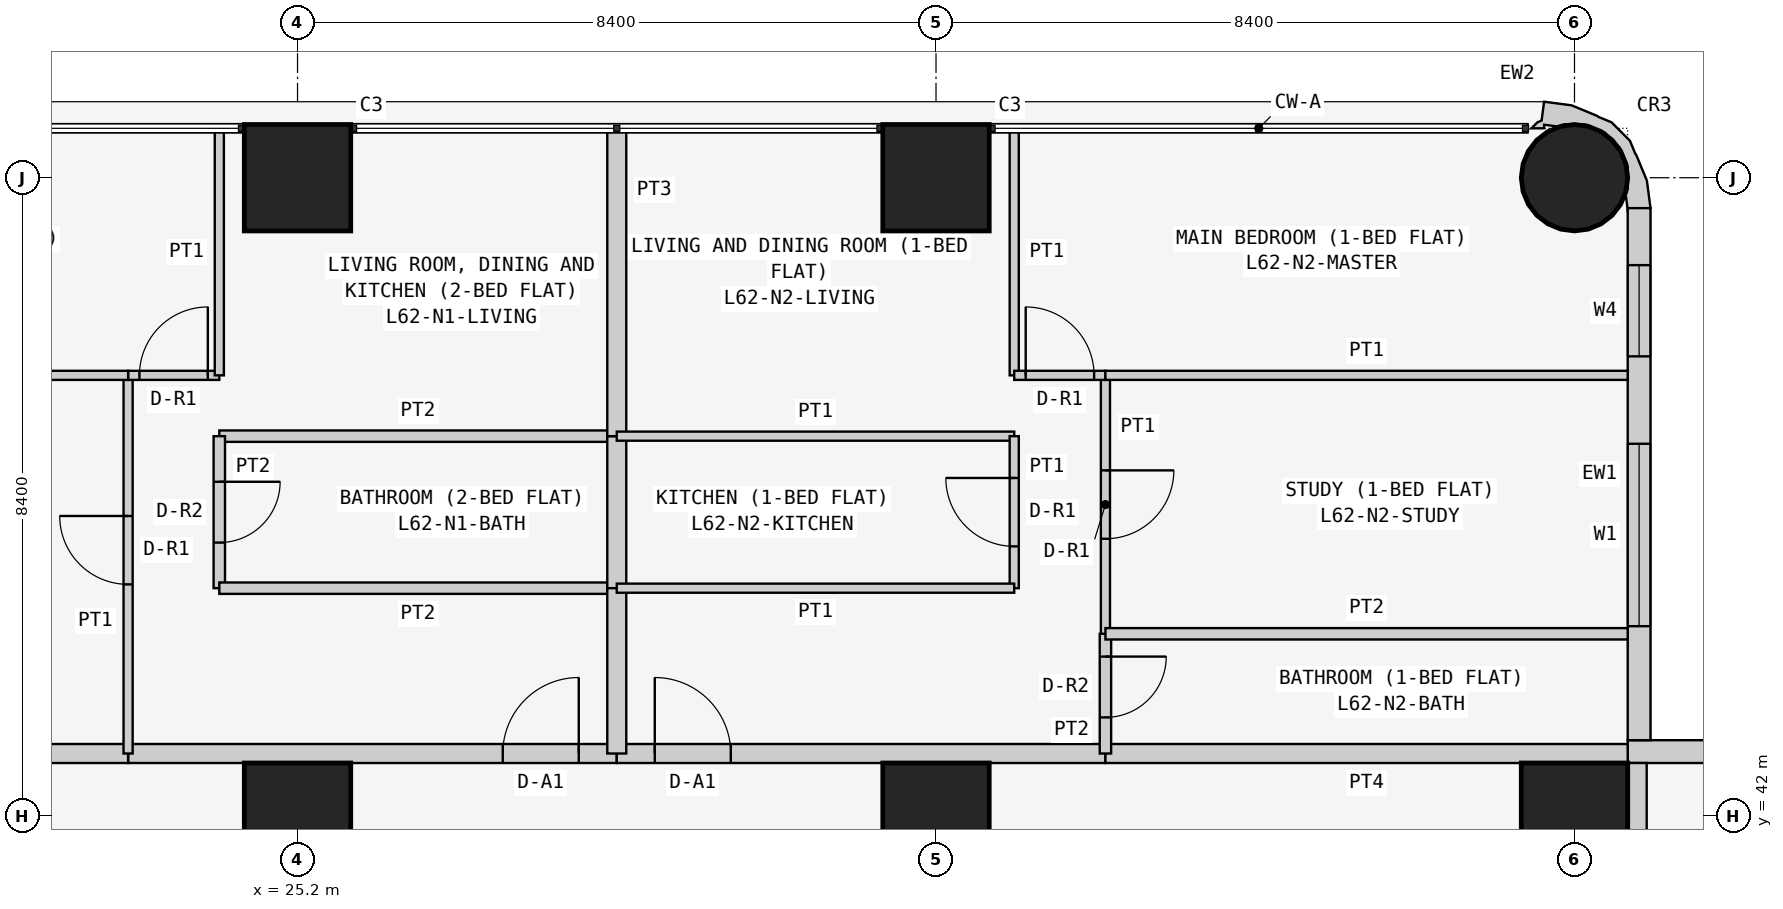
"""IFC4 building model, lengths in metres.
Left out: names, types, materials, properties, quantities, classifications, styles, units other than length and angle.
Written with IfcOpenShell. Run it as: python <this file> out.ifc"""

import sys

from ifc_helpers import new_model, si_unit, direction, frame, frame_2d, origin, origin_2d, place, context, subcontext, project, spatial, polyline, rectangle, circle, outline, extrude, element, fill, save


model = new_model("IFC4")
c1 = context("Model", 3, precision=1e-05, world=origin(), true_north=direction((0.0, 1.0)))
c2 = subcontext(c1, "Body", "Model", "MODEL_VIEW")
j1 = project(units=[si_unit("LENGTHUNIT", "METRE"), si_unit("PLANEANGLEUNIT", "RADIAN")], contexts=[c1])
p1 = place(None, origin())
s1 = spatial("IfcSite", under=j1, at=p1, CompositionType="ELEMENT")
p2 = place(p1, origin())
s2 = spatial("IfcBuilding", under=s1, at=p2, CompositionType="ELEMENT")
p3 = place(p2, frame((0.0, 0.0, 237.3)))
s3 = spatial("IfcBuildingStorey", under=s2, at=p3, CompositionType="ELEMENT", Elevation=237.3)
for number, where, z_axis, x_axis in (
    (1, (25.2, 42.0, 0.0), (0.0, 0.0, 1.0), (1.0, 0.0, 0.0)),
    (2, (25.2, 50.4, 0.0), (0.0, 0.0, 1.0), (1.0, 0.0, 0.0)),
    (3, (33.6, 42.0, 0.0), (0.0, 0.0, 1.0), (1.0, 0.0, 0.0)),
    (4, (33.6, 50.4, 0.0), (0.0, 0.0, 1.0), (1.0, 0.0, 0.0)),
    (5, (42.0, 42.0, 0.0), (0.0, 0.0, 1.0), (1.0, 0.0, 0.0)),
):
    element("IfcColumn", number, at=place(p3, frame(where, z_axis=z_axis, x_axis=x_axis)), inside=s3, PredefinedType="COLUMN", context=c2, shape_type="SweptSolid", body=[
        extrude(rectangle(XDim=1.4, YDim=1.4, at=origin_2d()), origin(), (0.0, 0.0, 1.0), 3.6),
    ])
p4 = place(p3, frame((42.0, 50.4, 0.0), z_axis=(0.0, 0.0, 1.0), x_axis=(1.0, 0.0, 0.0)))
e6 = element("IfcColumn", 6, at=p4, inside=s3, PredefinedType="COLUMN", context=c2, shape_type="SweptSolid", body=[
    extrude(circle(Radius=0.7, at=origin_2d()), origin(), (0.0, 0.0, 1.0), 3.6),
])
p5 = place(p3, frame((50.0, 42.85, 0.0), z_axis=(0.0, 0.0, 1.0), x_axis=(-1.0, 0.0, 0.0)))
e7 = element("IfcWall", 7, at=p5, inside=s3, PredefinedType="SOLIDWALL", context=c2, shape_type="SweptSolid", body=[
    extrude(rectangle(XDim=7.3, YDim=0.3, at=frame_2d((3.65, 0.0))), origin(), (0.0, 0.0, 1.0), 3.45),
])
p6 = place(p5, frame((3.1, 0.0, 0.9)))
e8 = element("IfcOpeningElement", 8, at=p6, cuts=e7, PredefinedType="OPENING", context=c2, shape_type="SweptSolid", body=[
    extrude(rectangle(XDim=2.4, YDim=1.5, at=frame_2d((1.2, 0.75))), frame((0.0, 0.16, 0.0), z_axis=(0.0, -1.0, 0.0), x_axis=(1.0, 0.0, 0.0)), (0.0, 0.0, 1.0), 0.32),
])
p7 = place(p5, frame((0.75, 0.0, 0.9)))
e9 = element("IfcOpeningElement", 9, at=p7, cuts=e7, PredefinedType="OPENING", context=c2, shape_type="SweptSolid", body=[
    extrude(rectangle(XDim=1.2, YDim=1.5, at=frame_2d((0.6, 0.75))), frame((0.0, 0.16, 0.0), z_axis=(0.0, -1.0, 0.0), x_axis=(1.0, 0.0, 0.0)), (0.0, 0.0, 1.0), 0.32),
])
p8 = place(p3, frame((42.85, 43.0, 0.0), z_axis=(0.0, 0.0, 1.0), x_axis=(0.0, 1.0, 0.0)))
e10 = element("IfcWall", 10, at=p8, inside=s3, PredefinedType="SOLIDWALL", context=c2, shape_type="SweptSolid", body=[
    extrude(rectangle(XDim=7.0, YDim=0.3, at=frame_2d((3.5, 0.0))), origin(), (0.0, 0.0, 1.0), 3.45),
])
p9 = place(p8, frame((1.5, 0.0, 0.9)))
e11 = element("IfcOpeningElement", 11, at=p9, cuts=e10, PredefinedType="OPENING", context=c2, shape_type="SweptSolid", body=[
    extrude(rectangle(XDim=2.4, YDim=1.5, at=frame_2d((1.2, 0.75))), frame((0.0, 0.16, 0.0), z_axis=(0.0, -1.0, 0.0), x_axis=(1.0, 0.0, 0.0)), (0.0, 0.0, 1.0), 0.32),
])
p10 = place(p8, frame((5.05, 0.0, 0.9)))
e12 = element("IfcOpeningElement", 12, at=p10, cuts=e10, PredefinedType="OPENING", context=c2, shape_type="SweptSolid", body=[
    extrude(rectangle(XDim=1.2, YDim=1.5, at=frame_2d((0.6, 0.75))), frame((0.0, 0.16, 0.0), z_axis=(0.0, -1.0, 0.0), x_axis=(1.0, 0.0, 0.0)), (0.0, 0.0, 1.0), 0.32),
])
p11 = place(p3, frame((42.724, 50.11, 0.0), z_axis=(0.0, 0.0, 1.0), x_axis=(0.439933741929, 0.898030234854, 0.0)))
e13 = element("IfcWall", 13, at=p11, inside=s3, PredefinedType="SOLIDWALL", context=c2, shape_type="SweptSolid", body=[
    extrude(outline(polyline([(-0.145, -0.044), (0.022, -0.296), (0.327, -0.094), (0.568, 0.18), (0.577, 0.199), (0.7, 0.337), (0.811, 0.661), (0.799, 0.845), (0.803, 0.866), (0.78, 1.231), (0.664, 1.577), (0.426, 1.497), (0.382, 1.536), (0.276, 1.572), (0.349, 1.423), (0.392, 1.444), (0.453, 1.261), (0.51, 1.211), (0.632, 0.961), (0.65, 0.683), (0.56, 0.419), (0.375, 0.21), (0.125, 0.087), (0.05, 0.082), (-0.127, -0.035), (-0.145, -0.044)])), origin(), (0.0, 0.0, 1.0), 3.45),
])
p12 = place(p3, frame((22.971, 42.825, 0.0), z_axis=(0.0, 0.0, 1.0), x_axis=(1.0, 0.0, 0.0)))
e14 = element("IfcWall", 14, at=p12, inside=s3, PredefinedType="PARTITIONING", context=c2, shape_type="SweptSolid", body=[
    extrude(rectangle(XDim=6.429, YDim=0.25, at=frame_2d((3.214, 0.0))), origin(), (0.0, 0.0, 1.0), 3.45),
])
p13 = place(p12, frame((4.929, 0.0, 0.0)))
e15 = element("IfcOpeningElement", 15, at=p13, cuts=e14, PredefinedType="OPENING", context=c2, shape_type="SweptSolid", body=[
    extrude(rectangle(XDim=1.0, YDim=2.1, at=frame_2d((0.5, 1.05))), frame((0.0, 0.135, 0.0), z_axis=(0.0, -1.0, 0.0), x_axis=(1.0, 0.0, 0.0)), (0.0, 0.0, 1.0), 0.27),
])
p14 = place(p3, frame((16.1, 42.825, 0.0), z_axis=(0.0, 0.0, 1.0), x_axis=(1.0, 0.0, 0.0)))
e16 = element("IfcWall", 16, at=p14, inside=s3, PredefinedType="PARTITIONING", context=c2, shape_type="SweptSolid", body=[
    extrude(rectangle(XDim=6.871, YDim=0.25, at=frame_2d((3.436, 0.0))), origin(), (0.0, 0.0, 1.0), 3.45),
])
p15 = place(p3, frame((29.4, 42.825, 0.0), z_axis=(0.0, 0.0, 1.0), x_axis=(1.0, 0.0, 0.0)))
e17 = element("IfcWall", 17, at=p15, inside=s3, PredefinedType="PARTITIONING", context=c2, shape_type="SweptSolid", body=[
    extrude(rectangle(XDim=6.429, YDim=0.25, at=frame_2d((3.215, 0.0))), origin(), (0.0, 0.0, 1.0), 3.45),
])
p16 = place(p15, frame((0.5, 0.0, 0.0)))
e18 = element("IfcOpeningElement", 18, at=p16, cuts=e17, PredefinedType="OPENING", context=c2, shape_type="SweptSolid", body=[
    extrude(rectangle(XDim=1.0, YDim=2.1, at=frame_2d((0.5, 1.05))), frame((0.0, 0.135, 0.0), z_axis=(0.0, -1.0, 0.0), x_axis=(1.0, 0.0, 0.0)), (0.0, 0.0, 1.0), 0.27),
])
for number, where, z_axis, x_axis in (
    (19, (35.829, 42.825, 0.0), (0.0, 0.0, 1.0), (1.0, 0.0, 0.0)),
    (20, (42.825, 42.7, 0.0), (0.0, 0.0, 1.0), (0.0, -1.0, 0.0)),
):
    element("IfcWall", number, at=place(p3, frame(where, z_axis=z_axis, x_axis=x_axis)), inside=s3, PredefinedType="PARTITIONING", context=c2, shape_type="SweptSolid", body=[
        extrude(rectangle(XDim=6.871, YDim=0.25, at=frame_2d((3.436, 0.0))), origin(), (0.0, 0.0, 1.0), 3.45),
    ])
p17 = place(p3, frame((29.4, 47.0, 0.0), z_axis=(0.0, 0.0, 1.0), x_axis=(-1.0, 0.0, 0.0)))
e21 = element("IfcWall", 21, at=p17, inside=s3, PredefinedType="PARTITIONING", context=c2, shape_type="SweptSolid", body=[
    extrude(rectangle(XDim=5.229, YDim=0.15, at=frame_2d((2.615, 0.0))), origin(), (0.0, 0.0, 1.0), 3.45),
])
p18 = place(p3, frame((24.171, 47.0, 0.0), z_axis=(0.0, 0.0, 1.0), x_axis=(0.0, -1.0, 0.0)))
e22 = element("IfcWall", 22, at=p18, inside=s3, PredefinedType="PARTITIONING", context=c2, shape_type="SweptSolid", body=[
    extrude(rectangle(XDim=2.0, YDim=0.15, at=frame_2d((1.0, 0.0))), origin(), (0.0, 0.0, 1.0), 3.45),
])
p19 = place(p18, frame((0.6, 0.0, 0.0)))
e23 = element("IfcOpeningElement", 23, at=p19, cuts=e22, PredefinedType="OPENING", context=c2, shape_type="SweptSolid", body=[
    extrude(rectangle(XDim=0.8, YDim=2.1, at=frame_2d((0.4, 1.05))), frame((0.0, 0.085, 0.0), z_axis=(0.0, -1.0, 0.0), x_axis=(1.0, 0.0, 0.0)), (0.0, 0.0, 1.0), 0.17),
])
p20 = place(p3, frame((24.171, 45.0, 0.0), z_axis=(0.0, 0.0, 1.0), x_axis=(1.0, 0.0, 0.0)))
e24 = element("IfcWall", 24, at=p20, inside=s3, PredefinedType="PARTITIONING", context=c2, shape_type="SweptSolid", body=[
    extrude(rectangle(XDim=5.229, YDim=0.15, at=frame_2d((2.615, 0.0))), origin(), (0.0, 0.0, 1.0), 3.45),
])
p21 = place(p3, frame((29.4, 45.0, 0.0), z_axis=(0.0, 0.0, 1.0), x_axis=(0.0, 1.0, 0.0)))
e25 = element("IfcWall", 25, at=p21, inside=s3, PredefinedType="PARTITIONING", context=c2, shape_type="SweptSolid", body=[
    extrude(rectangle(XDim=2.0, YDim=0.25, at=frame_2d((1.0, 0.0))), origin(), (0.0, 0.0, 1.0), 2.848),
])
p22 = place(p3, frame((22.971, 42.825, 0.0), z_axis=(0.0, 0.0, 1.0), x_axis=(0.0, 1.0, 0.0)))
e26 = element("IfcWall", 26, at=p22, inside=s3, PredefinedType="PARTITIONING", context=c2, shape_type="SweptSolid", body=[
    extrude(rectangle(XDim=4.975, YDim=0.12, at=frame_2d((2.488, 0.0))), origin(), (0.0, 0.0, 1.0), 3.45),
])
p23 = place(p22, frame((2.225, 0.0, 0.0)))
e27 = element("IfcOpeningElement", 27, at=p23, cuts=e26, PredefinedType="OPENING", context=c2, shape_type="SweptSolid", body=[
    extrude(rectangle(XDim=0.9, YDim=2.1, at=frame_2d((0.45, 1.05))), frame((0.0, 0.07, 0.0), z_axis=(0.0, -1.0, 0.0), x_axis=(1.0, 0.0, 0.0)), (0.0, 0.0, 1.0), 0.14),
])
p24 = place(p3, frame((22.971, 47.8, 0.0), z_axis=(0.0, 0.0, 1.0), x_axis=(1.0, 0.0, 0.0)))
e28 = element("IfcWall", 28, at=p24, inside=s3, PredefinedType="PARTITIONING", context=c2, shape_type="SweptSolid", body=[
    extrude(rectangle(XDim=1.2, YDim=0.12, at=frame_2d((0.6, 0.0))), origin(), (0.0, 0.0, 1.0), 3.45),
])
p25 = place(p24, frame((0.149, 0.0, 0.0)))
e29 = element("IfcOpeningElement", 29, at=p25, cuts=e28, PredefinedType="OPENING", context=c2, shape_type="SweptSolid", body=[
    extrude(rectangle(XDim=0.9, YDim=2.1, at=frame_2d((0.45, 1.05))), frame((0.0, 0.07, 0.0), z_axis=(0.0, -1.0, 0.0), x_axis=(1.0, 0.0, 0.0)), (0.0, 0.0, 1.0), 0.14),
])
p26 = place(p3, frame((24.171, 47.8, 0.0), z_axis=(0.0, 0.0, 1.0), x_axis=(0.0, 1.0, 0.0)))
e30 = element("IfcWall", 30, at=p26, inside=s3, PredefinedType="PARTITIONING", context=c2, shape_type="SweptSolid", body=[
    extrude(rectangle(XDim=3.25, YDim=0.12, at=frame_2d((1.625, 0.0))), origin(), (0.0, 0.0, 1.0), 3.45),
])
p27 = place(p3, frame((29.4, 45.0, 0.0), z_axis=(0.0, 0.0, 1.0), x_axis=(0.0, -1.0, 0.0)))
e31 = element("IfcWall", 31, at=p27, inside=s3, PredefinedType="PARTITIONING", context=c2, shape_type="SweptSolid", body=[
    extrude(rectangle(XDim=2.175, YDim=0.25, at=frame_2d((1.087, 0.0))), origin(), (0.0, 0.0, 1.0), 2.848),
])
p28 = place(p3, frame((29.4, 51.05, 0.0), z_axis=(0.0, 0.0, 1.0), x_axis=(0.0, -1.0, 0.0)))
e32 = element("IfcWall", 32, at=p28, inside=s3, PredefinedType="PARTITIONING", context=c2, shape_type="SweptSolid", body=[
    extrude(rectangle(XDim=4.05, YDim=0.25, at=frame_2d((2.025, 0.0))), origin(), (0.0, 0.0, 1.0), 2.848),
])
p29 = place(p3, frame((22.971, 47.8, 0.0), z_axis=(0.0, 0.0, 1.0), x_axis=(-1.0, 0.0, 0.0)))
e33 = element("IfcWall", 33, at=p29, inside=s3, PredefinedType="PARTITIONING", context=c2, shape_type="SweptSolid", body=[
    extrude(rectangle(XDim=6.871, YDim=0.12, at=frame_2d((3.436, 0.0))), origin(), (0.0, 0.0, 1.0), 3.45),
])
p30 = place(p3, frame((29.4, 47.0, 0.0), z_axis=(0.0, 0.0, 1.0), x_axis=(1.0, 0.0, 0.0)))
e34 = element("IfcWall", 34, at=p30, inside=s3, PredefinedType="PARTITIONING", context=c2, shape_type="SweptSolid", body=[
    extrude(rectangle(XDim=5.229, YDim=0.12, at=frame_2d((2.615, 0.0))), origin(), (0.0, 0.0, 1.0), 3.45),
])
p31 = place(p3, frame((34.629, 47.0, 0.0), z_axis=(0.0, 0.0, 1.0), x_axis=(0.0, -1.0, 0.0)))
e35 = element("IfcWall", 35, at=p31, inside=s3, PredefinedType="PARTITIONING", context=c2, shape_type="SweptSolid", body=[
    extrude(rectangle(XDim=2.0, YDim=0.12, at=frame_2d((1.0, 0.0))), origin(), (0.0, 0.0, 1.0), 3.45),
])
p32 = place(p31, frame((0.55, 0.0, 0.0)))
e36 = element("IfcOpeningElement", 36, at=p32, cuts=e35, PredefinedType="OPENING", context=c2, shape_type="SweptSolid", body=[
    extrude(rectangle(XDim=0.9, YDim=2.1, at=frame_2d((0.45, 1.05))), frame((0.0, 0.07, 0.0), z_axis=(0.0, -1.0, 0.0), x_axis=(1.0, 0.0, 0.0)), (0.0, 0.0, 1.0), 0.14),
])
p33 = place(p3, frame((34.629, 45.0, 0.0), z_axis=(0.0, 0.0, 1.0), x_axis=(-1.0, 0.0, 0.0)))
e37 = element("IfcWall", 37, at=p33, inside=s3, PredefinedType="PARTITIONING", context=c2, shape_type="SweptSolid", body=[
    extrude(rectangle(XDim=5.229, YDim=0.12, at=frame_2d((2.615, 0.0))), origin(), (0.0, 0.0, 1.0), 3.45),
])
p34 = place(p3, frame((35.829, 44.4, 0.0), z_axis=(0.0, 0.0, 1.0), x_axis=(0.0, -1.0, 0.0)))
e38 = element("IfcWall", 38, at=p34, inside=s3, PredefinedType="PARTITIONING", context=c2, shape_type="SweptSolid", body=[
    extrude(rectangle(XDim=1.575, YDim=0.15, at=frame_2d((0.788, 0.0))), origin(), (0.0, 0.0, 1.0), 3.45),
])
p35 = place(p34, frame((0.3, 0.0, 0.0)))
e39 = element("IfcOpeningElement", 39, at=p35, cuts=e38, PredefinedType="OPENING", context=c2, shape_type="SweptSolid", body=[
    extrude(rectangle(XDim=0.8, YDim=2.1, at=frame_2d((0.4, 1.05))), frame((0.0, 0.085, 0.0), z_axis=(0.0, -1.0, 0.0), x_axis=(1.0, 0.0, 0.0)), (0.0, 0.0, 1.0), 0.17),
])
p36 = place(p3, frame((35.829, 47.8, 0.0), z_axis=(0.0, 0.0, 1.0), x_axis=(0.0, -1.0, 0.0)))
e40 = element("IfcWall", 40, at=p36, inside=s3, PredefinedType="PARTITIONING", context=c2, shape_type="SweptSolid", body=[
    extrude(rectangle(XDim=3.4, YDim=0.12, at=frame_2d((1.7, 0.0))), origin(), (0.0, 0.0, 1.0), 3.45),
])
p37 = place(p36, frame((1.25, 0.0, 0.0)))
e41 = element("IfcOpeningElement", 41, at=p37, cuts=e40, PredefinedType="OPENING", context=c2, shape_type="SweptSolid", body=[
    extrude(rectangle(XDim=0.9, YDim=2.1, at=frame_2d((0.45, 1.05))), frame((0.0, 0.07, 0.0), z_axis=(0.0, -1.0, 0.0), x_axis=(1.0, 0.0, 0.0)), (0.0, 0.0, 1.0), 0.14),
])
p38 = place(p3, frame((34.629, 51.05, 0.0), z_axis=(0.0, 0.0, 1.0), x_axis=(0.0, -1.0, 0.0)))
e42 = element("IfcWall", 42, at=p38, inside=s3, PredefinedType="PARTITIONING", context=c2, shape_type="SweptSolid", body=[
    extrude(rectangle(XDim=3.25, YDim=0.12, at=frame_2d((1.625, 0.0))), origin(), (0.0, 0.0, 1.0), 3.45),
])
p39 = place(p3, frame((34.629, 47.8, 0.0), z_axis=(0.0, 0.0, 1.0), x_axis=(1.0, 0.0, 0.0)))
e43 = element("IfcWall", 43, at=p39, inside=s3, PredefinedType="PARTITIONING", context=c2, shape_type="SweptSolid", body=[
    extrude(rectangle(XDim=1.2, YDim=0.12, at=frame_2d((0.6, 0.0))), origin(), (0.0, 0.0, 1.0), 3.45),
])
p40 = place(p39, frame((0.151, 0.0, 0.0)))
e44 = element("IfcOpeningElement", 44, at=p40, cuts=e43, PredefinedType="OPENING", context=c2, shape_type="SweptSolid", body=[
    extrude(rectangle(XDim=0.9, YDim=2.1, at=frame_2d((0.45, 1.05))), frame((0.0, 0.07, 0.0), z_axis=(0.0, -1.0, 0.0), x_axis=(1.0, 0.0, 0.0)), (0.0, 0.0, 1.0), 0.14),
])
p41 = place(p3, frame((35.829, 44.4, 0.0), z_axis=(0.0, 0.0, 1.0), x_axis=(1.0, 0.0, 0.0)))
e45 = element("IfcWall", 45, at=p41, inside=s3, PredefinedType="PARTITIONING", context=c2, shape_type="SweptSolid", body=[
    extrude(rectangle(XDim=6.871, YDim=0.15, at=frame_2d((3.436, 0.0))), origin(), (0.0, 0.0, 1.0), 3.45),
])
p42 = place(p3, frame((35.829, 47.8, 0.0), z_axis=(0.0, 0.0, 1.0), x_axis=(1.0, 0.0, 0.0)))
e46 = element("IfcWall", 46, at=p42, inside=s3, PredefinedType="PARTITIONING", context=c2, shape_type="SweptSolid", body=[
    extrude(rectangle(XDim=6.871, YDim=0.12, at=frame_2d((3.436, 0.0))), origin(), (0.0, 0.0, 1.0), 3.45),
])
p43 = place(p9, origin())
e47 = element("IfcWindow", 47, at=p43, inside=s3, PartitioningType="SINGLE_PANEL", PredefinedType="WINDOW", context=c2, shape_type="SweptSolid", body=[
    extrude(rectangle(XDim=2.4, YDim=1.5, at=frame_2d((1.2, 0.75))), frame((0.0, 0.03, 0.0), z_axis=(0.0, -1.0, 0.0), x_axis=(1.0, 0.0, 0.0)), (0.0, 0.0, 1.0), 0.06),
])
fill(e11, e47)
p44 = place(p10, origin())
e48 = element("IfcWindow", 48, at=p44, inside=s3, PartitioningType="SINGLE_PANEL", PredefinedType="WINDOW", context=c2, shape_type="SweptSolid", body=[
    extrude(rectangle(XDim=1.2, YDim=1.5, at=frame_2d((0.6, 0.75))), frame((0.0, 0.03, 0.0), z_axis=(0.0, -1.0, 0.0), x_axis=(1.0, 0.0, 0.0)), (0.0, 0.0, 1.0), 0.06),
])
fill(e12, e48)
p45 = place(p13, origin())
e49 = element("IfcDoor", 49, at=p45, inside=s3, OperationType="SINGLE_SWING_RIGHT", PredefinedType="DOOR", context=c2, shape_type="SweptSolid", body=[
    extrude(rectangle(XDim=1.0, YDim=2.1, at=frame_2d((0.5, 1.05))), frame((0.0, 0.025, 0.0), z_axis=(0.0, -1.0, 0.0), x_axis=(1.0, 0.0, 0.0)), (0.0, 0.0, 1.0), 0.05),
])
fill(e15, e49)
p46 = place(p19, origin())
e50 = element("IfcDoor", 50, at=p46, inside=s3, OperationType="SINGLE_SWING_LEFT", PredefinedType="DOOR", context=c2, shape_type="SweptSolid", body=[
    extrude(rectangle(XDim=0.8, YDim=2.1, at=frame_2d((0.4, 1.05))), frame((0.0, 0.025, 0.0), z_axis=(0.0, -1.0, 0.0), x_axis=(1.0, 0.0, 0.0)), (0.0, 0.0, 1.0), 0.05),
])
fill(e23, e50)
p47 = place(p23, origin())
e51 = element("IfcDoor", 51, at=p47, inside=s3, OperationType="SINGLE_SWING_RIGHT", PredefinedType="DOOR", context=c2, shape_type="SweptSolid", body=[
    extrude(rectangle(XDim=0.9, YDim=2.1, at=frame_2d((0.45, 1.05))), frame((0.0, 0.025, 0.0), z_axis=(0.0, -1.0, 0.0), x_axis=(1.0, 0.0, 0.0)), (0.0, 0.0, 1.0), 0.05),
])
fill(e27, e51)
p48 = place(p25, origin())
e52 = element("IfcDoor", 52, at=p48, inside=s3, OperationType="SINGLE_SWING_RIGHT", PredefinedType="DOOR", context=c2, shape_type="SweptSolid", body=[
    extrude(rectangle(XDim=0.9, YDim=2.1, at=frame_2d((0.45, 1.05))), frame((0.0, 0.025, 0.0), z_axis=(0.0, -1.0, 0.0), x_axis=(1.0, 0.0, 0.0)), (0.0, 0.0, 1.0), 0.05),
])
fill(e29, e52)
p49 = place(p16, origin())
e53 = element("IfcDoor", 53, at=p49, inside=s3, OperationType="SINGLE_SWING_LEFT", PredefinedType="DOOR", context=c2, shape_type="SweptSolid", body=[
    extrude(rectangle(XDim=1.0, YDim=2.1, at=frame_2d((0.5, 1.05))), frame((0.0, 0.025, 0.0), z_axis=(0.0, -1.0, 0.0), x_axis=(1.0, 0.0, 0.0)), (0.0, 0.0, 1.0), 0.05),
])
fill(e18, e53)
p50 = place(p32, frame((0.9, 0.0, 0.0), z_axis=(0.0, 0.0, 1.0), x_axis=(-1.0, 0.0, 0.0)))
e54 = element("IfcDoor", 54, at=p50, inside=s3, OperationType="SINGLE_SWING_RIGHT", PredefinedType="DOOR", context=c2, shape_type="SweptSolid", body=[
    extrude(rectangle(XDim=0.9, YDim=2.1, at=frame_2d((0.45, 1.05))), frame((0.0, 0.025, 0.0), z_axis=(0.0, -1.0, 0.0), x_axis=(1.0, 0.0, 0.0)), (0.0, 0.0, 1.0), 0.05),
])
fill(e36, e54)
p51 = place(p35, origin())
e55 = element("IfcDoor", 55, at=p51, inside=s3, OperationType="SINGLE_SWING_LEFT", PredefinedType="DOOR", context=c2, shape_type="SweptSolid", body=[
    extrude(rectangle(XDim=0.8, YDim=2.1, at=frame_2d((0.4, 1.05))), frame((0.0, 0.025, 0.0), z_axis=(0.0, -1.0, 0.0), x_axis=(1.0, 0.0, 0.0)), (0.0, 0.0, 1.0), 0.05),
])
fill(e39, e55)
p52 = place(p37, origin())
e56 = element("IfcDoor", 56, at=p52, inside=s3, OperationType="SINGLE_SWING_LEFT", PredefinedType="DOOR", context=c2, shape_type="SweptSolid", body=[
    extrude(rectangle(XDim=0.9, YDim=2.1, at=frame_2d((0.45, 1.05))), frame((0.0, 0.025, 0.0), z_axis=(0.0, -1.0, 0.0), x_axis=(1.0, 0.0, 0.0)), (0.0, 0.0, 1.0), 0.05),
])
fill(e41, e56)
p53 = place(p40, origin())
e57 = element("IfcDoor", 57, at=p53, inside=s3, OperationType="SINGLE_SWING_LEFT", PredefinedType="DOOR", context=c2, shape_type="SweptSolid", body=[
    extrude(rectangle(XDim=0.9, YDim=2.1, at=frame_2d((0.45, 1.05))), frame((0.0, 0.025, 0.0), z_axis=(0.0, -1.0, 0.0), x_axis=(1.0, 0.0, 0.0)), (0.0, 0.0, 1.0), 0.05),
])
fill(e44, e57)
save(model, sys.argv[1])
